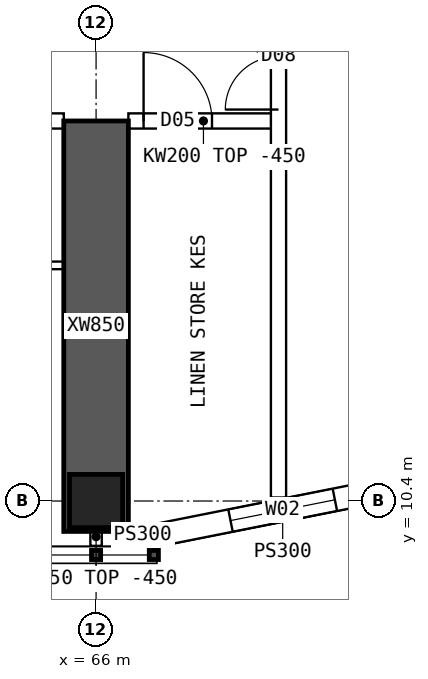
"""IFC4 building model, lengths in metres.
Left out: names, types, materials, properties, quantities, classifications, styles, units other than length and angle.
Written with IfcOpenShell. Run it as: python <this file> out.ifc"""

import sys

from ifc_helpers import new_model, si_unit, direction, frame, frame_2d, origin, origin_2d, place, context, subcontext, project, spatial, polyline, rectangle, hollow_rectangle, outline, extrude, element, fill, save


model = new_model("IFC4")
c1 = context("Model", 3, precision=1e-05, world=origin(), true_north=direction((0.0, 1.0)))
c2 = subcontext(c1, "Body", "Model", "MODEL_VIEW")
j1 = project(units=[si_unit("LENGTHUNIT", "METRE"), si_unit("PLANEANGLEUNIT", "RADIAN")], contexts=[c1])
p1 = place(None, origin())
s1 = spatial("IfcSite", under=j1, at=p1, CompositionType="ELEMENT")
p2 = place(p1, origin())
s2 = spatial("IfcBuilding", under=s1, at=p2, CompositionType="ELEMENT")
p3 = place(p2, frame((0.0, 0.0, 189.85)))
s3 = spatial("IfcBuildingStorey", under=s2, at=p3, CompositionType="ELEMENT", Elevation=189.85)
p4 = place(p3, frame((66.0, 10.4, 0.0), z_axis=(0.0, 0.0, 1.0), x_axis=(1.0, 0.0, 0.0)))
e1 = element("IfcColumn", 1, at=p4, inside=s3, PredefinedType="COLUMN", context=c2, shape_type="SweptSolid", body=[
    extrude(hollow_rectangle(XDim=0.7, YDim=0.7, WallThickness=0.07, at=origin_2d()), origin(), (0.0, 0.0, 1.0), 3.75),
])
p5 = place(p3, frame((66.0, 10.0, 0.0), z_axis=(0.0, 0.0, 1.0), x_axis=(0.0, 1.0, 0.0)))
e2 = element("IfcWall", 2, at=p5, inside=s3, PredefinedType="SHEAR", context=c2, shape_type="SweptSolid", body=[
    extrude(rectangle(XDim=5.4, YDim=0.85, at=frame_2d((2.7, 0.0))), origin(), (0.0, 0.0, 1.0), 3.75),
])
p6 = place(p3, frame((66.8, 9.95, 0.0), z_axis=(0.0, 0.0, 1.0), x_axis=(0.98078325777, 0.195100490205, 0.0)))
e3 = element("IfcWall", 3, at=p6, inside=s3, PredefinedType="SOLIDWALL", context=c2, shape_type="SweptSolid", body=[
    extrude(outline(polyline([(-0.03, -0.15), (3.405, -0.15), (3.345, 0.15), (0.03, 0.15), (-0.03, -0.15)])), origin(), (0.0, 0.0, 1.0), 3.3),
])
p7 = place(p6, frame((0.988, 0.0, 0.9)))
e4 = element("IfcOpeningElement", 4, at=p7, cuts=e3, PredefinedType="OPENING", context=c2, shape_type="SweptSolid", body=[
    extrude(rectangle(XDim=1.4, YDim=1.8, at=frame_2d((0.7, 0.9))), frame((0.0, 0.16, 0.0), z_axis=(0.0, -1.0, 0.0), x_axis=(1.0, 0.0, 0.0)), (0.0, 0.0, 1.0), 0.32),
])
p8 = place(p3, frame((66.8, 9.95, 0.0), z_axis=(0.0, 0.0, 1.0), x_axis=(-1.0, 0.0, 0.0)))
e5 = element("IfcWall", 5, at=p8, inside=s3, PredefinedType="SOLIDWALL", context=c2, shape_type="SweptSolid", body=[
    extrude(rectangle(XDim=0.375, YDim=0.3, at=frame_2d((0.188, 0.0))), origin(), (0.0, 0.0, 1.0), 3.3),
])
p9 = place(p3, frame((60.425, 15.4, 0.0), z_axis=(0.0, 0.0, 1.0), x_axis=(1.0, 0.0, 0.0)))
e6 = element("IfcWall", 6, at=p9, inside=s3, PredefinedType="SOLIDWALL", context=c2, shape_type="SweptSolid", body=[
    extrude(outline(polyline([(0.0, 0.0), (5.15, 0.0), (5.15, 2.9), (0.0, 2.9), (0.0, 0.0)])), frame((0.0, 0.1, 0.0), z_axis=(0.0, -1.0, 0.0), x_axis=(1.0, 0.0, 0.0)), (0.0, 0.0, 1.0), 0.2),
])
p10 = place(p9, frame((0.1, 0.0, 0.0)))
e7 = element("IfcOpeningElement", 7, at=p10, cuts=e6, PredefinedType="OPENING", context=c2, shape_type="SweptSolid", body=[
    extrude(rectangle(XDim=0.9, YDim=2.1, at=frame_2d((0.45, 1.05))), frame((0.0, 0.11, 0.0), z_axis=(0.0, -1.0, 0.0), x_axis=(1.0, 0.0, 0.0)), (0.0, 0.0, 1.0), 0.22),
])
p11 = place(p3, frame((66.425, 15.4, 0.0), z_axis=(0.0, 0.0, 1.0), x_axis=(1.0, 0.0, 0.0)))
e8 = element("IfcWall", 8, at=p11, inside=s3, PredefinedType="SOLIDWALL", context=c2, shape_type="SweptSolid", body=[
    extrude(rectangle(XDim=1.975, YDim=0.2, at=frame_2d((0.987, 0.0))), origin(), (0.0, 0.0, 1.0), 3.3),
])
p12 = place(p11, frame((0.2, 0.0, 0.0)))
e9 = element("IfcOpeningElement", 9, at=p12, cuts=e8, PredefinedType="OPENING", context=c2, shape_type="SweptSolid", body=[
    extrude(rectangle(XDim=0.9, YDim=2.1, at=frame_2d((0.45, 1.05))), frame((0.0, 0.11, 0.0), z_axis=(0.0, -1.0, 0.0), x_axis=(1.0, 0.0, 0.0)), (0.0, 0.0, 1.0), 0.22),
])
p13 = place(p3, frame((65.575, 13.5, 0.0), z_axis=(0.0, 0.0, 1.0), x_axis=(-1.0, 0.0, 0.0)))
e10 = element("IfcWall", 10, at=p13, inside=s3, PredefinedType="PARTITIONING", context=c2, shape_type="SweptSolid", body=[
    extrude(rectangle(XDim=2.55, YDim=0.1, at=frame_2d((1.275, 0.0))), origin(), (0.0, 0.0, 1.0), 3.3),
])
p14 = place(p13, frame((0.825, 0.0, 0.0)))
e11 = element("IfcOpeningElement", 11, at=p14, cuts=e10, PredefinedType="OPENING", context=c2, shape_type="SweptSolid", body=[
    extrude(rectangle(XDim=0.9, YDim=2.1, at=frame_2d((0.45, 1.05))), frame((0.0, 0.06, 0.0), z_axis=(0.0, -1.0, 0.0), x_axis=(1.0, 0.0, 0.0)), (0.0, 0.0, 1.0), 0.12),
])
p15 = place(p3, frame((68.4, 10.446, 0.0), z_axis=(0.0, 0.0, 1.0), x_axis=(0.0, 1.0, 0.0)))
e12 = element("IfcWall", 12, at=p15, inside=s3, PredefinedType="SOLIDWALL", context=c2, shape_type="SweptSolid", body=[
    extrude(rectangle(XDim=43.107, YDim=0.2, at=frame_2d((21.554, 0.0))), origin(), (0.0, 0.0, 1.0), 3.3),
])
p16 = place(p15, frame((27.994, 0.0, 0.0)))
e13 = element("IfcOpeningElement", 13, at=p16, cuts=e12, PredefinedType="OPENING", context=c2, shape_type="SweptSolid", body=[
    extrude(rectangle(XDim=1.2, YDim=2.1, at=frame_2d((0.6, 1.05))), frame((0.0, 0.11, 0.0), z_axis=(0.0, -1.0, 0.0), x_axis=(1.0, 0.0, 0.0)), (0.0, 0.0, 1.0), 0.22),
])
p17 = place(p15, frame((5.104, 0.0, 0.0)))
e14 = element("IfcOpeningElement", 14, at=p17, cuts=e12, PredefinedType="OPENING", context=c2, shape_type="SweptSolid", body=[
    extrude(rectangle(XDim=1.4, YDim=2.1, at=frame_2d((0.7, 1.05))), frame((0.0, 0.11, 0.0), z_axis=(0.0, -1.0, 0.0), x_axis=(1.0, 0.0, 0.0)), (0.0, 0.0, 1.0), 0.22),
])
p18 = place(p15, frame((36.504, 0.0, 0.0)))
e15 = element("IfcOpeningElement", 15, at=p18, cuts=e12, PredefinedType="OPENING", context=c2, shape_type="SweptSolid", body=[
    extrude(rectangle(XDim=1.4, YDim=2.1, at=frame_2d((0.7, 1.05))), frame((0.0, 0.11, 0.0), z_axis=(0.0, -1.0, 0.0), x_axis=(1.0, 0.0, 0.0)), (0.0, 0.0, 1.0), 0.22),
])
p19 = place(p3, frame((66.0, 10.05, 0.0), z_axis=(0.0, 0.0, 1.0), x_axis=(0.0, -1.0, 0.0)))
e16 = element("IfcWall", 16, at=p19, inside=s3, PredefinedType="PARTITIONING", context=c2, shape_type="SweptSolid", body=[
    extrude(rectangle(XDim=0.24, YDim=0.15, at=frame_2d((0.12, 0.0))), origin(), (0.0, 0.0, 1.0), 3.3),
])
p20 = place(p7, origin())
e17 = element("IfcWindow", 17, at=p20, inside=s3, PartitioningType="SINGLE_PANEL", PredefinedType="WINDOW", context=c2, shape_type="SweptSolid", body=[
    extrude(rectangle(XDim=1.4, YDim=1.8, at=frame_2d((0.7, 0.9))), frame((0.0, 0.03, 0.0), z_axis=(0.0, -1.0, 0.0), x_axis=(1.0, 0.0, 0.0)), (0.0, 0.0, 1.0), 0.06),
])
fill(e4, e17)
p21 = place(p17, origin())
e18 = element("IfcDoor", 18, at=p21, inside=s3, OperationType="DOUBLE_DOOR_SINGLE_SWING", PredefinedType="DOOR", context=c2, shape_type="SweptSolid", body=[
    extrude(rectangle(XDim=1.4, YDim=2.1, at=frame_2d((0.7, 1.05))), frame((0.0, 0.025, 0.0), z_axis=(0.0, -1.0, 0.0), x_axis=(1.0, 0.0, 0.0)), (0.0, 0.0, 1.0), 0.05),
])
fill(e14, e18)
p22 = place(p12, origin())
e19 = element("IfcDoor", 19, at=p22, inside=s3, OperationType="SINGLE_SWING_LEFT", PredefinedType="DOOR", context=c2, shape_type="SweptSolid", body=[
    extrude(rectangle(XDim=0.9, YDim=2.1, at=frame_2d((0.45, 1.05))), frame((0.0, 0.025, 0.0), z_axis=(0.0, -1.0, 0.0), x_axis=(1.0, 0.0, 0.0)), (0.0, 0.0, 1.0), 0.05),
])
fill(e9, e19)
save(model, sys.argv[1])
